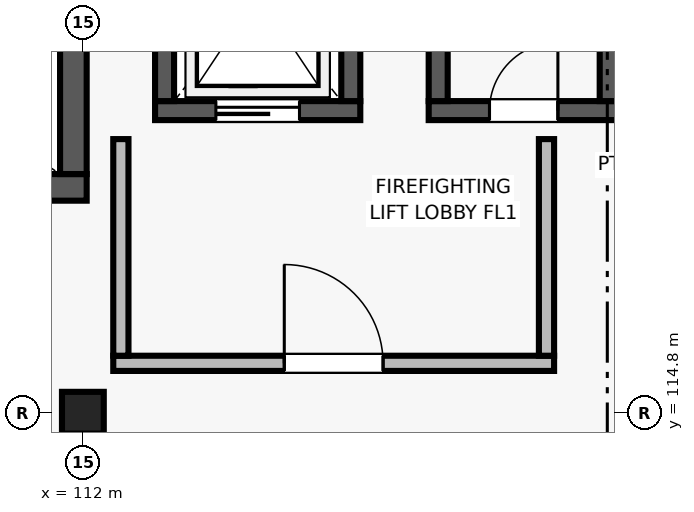
"""IFC4 building model, lengths in metres.
Left out: names, types, materials, properties, quantities, classifications, styles, units other than length and angle.
Written with IfcOpenShell. Run it as: python <this file> out.ifc"""

import sys

from ifc_helpers import new_model, si_unit, direction, frame, frame_2d, origin, origin_2d, place, context, subcontext, project, spatial, rectangle, extrude, element, fill, save


model = new_model("IFC4")
c1 = context("Model", 3, precision=1e-05, world=origin(), true_north=direction((0.0, 1.0)))
c2 = subcontext(c1, "Body", "Model", "MODEL_VIEW")
j1 = project(units=[si_unit("LENGTHUNIT", "METRE"), si_unit("PLANEANGLEUNIT", "RADIAN")], contexts=[c1])
p1 = place(None, origin())
s1 = spatial("IfcSite", under=j1, at=p1, CompositionType="ELEMENT")
p2 = place(p1, origin())
s2 = spatial("IfcBuilding", under=s1, at=p2, CompositionType="ELEMENT")
p3 = place(p2, frame((0.0, 0.0, 21.6)))
s3 = spatial("IfcBuildingStorey", under=s2, at=p3, CompositionType="ELEMENT", Elevation=21.6)
p4 = place(p3, frame((112.0, 114.8, 0.0), z_axis=(0.0, 0.0, 1.0), x_axis=(1.0, 0.0, 0.0)))
e1 = element("IfcColumn", 1, at=p4, inside=s3, PredefinedType="COLUMN", context=c2, shape_type="SweptSolid", body=[
    extrude(rectangle(XDim=0.55, YDim=0.55, at=origin_2d()), origin(), (0.0, 0.0, 1.0), 4.2),
])
p5 = place(p3, frame((103.95, 117.765, 0.0), z_axis=(0.0, 0.0, 1.0), x_axis=(1.0, 0.0, 0.0)))
e2 = element("IfcWall", 2, at=p5, inside=s3, PredefinedType="SHEAR", context=c2, shape_type="SweptSolid", body=[
    extrude(rectangle(XDim=8.1, YDim=0.35, at=frame_2d((4.05, 0.0))), origin(), (0.0, 0.0, 1.0), 3.92),
])
p6 = place(p5, frame((0.6, 0.0, 0.0)))
e3 = element("IfcOpeningElement", 3, at=p6, cuts=e2, PredefinedType="OPENING", context=c2, shape_type="SweptSolid", body=[
    extrude(rectangle(XDim=1.25, YDim=2.2, at=frame_2d((0.625, 1.1))), frame((0.0, 0.185, 0.0), z_axis=(0.0, -1.0, 0.0), x_axis=(1.0, 0.0, 0.0)), (0.0, 0.0, 1.0), 0.37),
])
p7 = place(p3, frame((111.875, 117.94, 0.0), z_axis=(0.0, 0.0, 1.0), x_axis=(0.0, 1.0, 0.0)))
e4 = element("IfcWall", 4, at=p7, inside=s3, PredefinedType="SHEAR", context=c2, shape_type="SweptSolid", body=[
    extrude(rectangle(XDim=3.76, YDim=0.35, at=frame_2d((1.88, 0.0))), origin(), (0.0, 0.0, 1.0), 3.92),
])
p8 = place(p3, frame((112.95, 118.775, 0.0), z_axis=(0.0, 0.0, 1.0), x_axis=(1.0, 0.0, 0.0)))
e5 = element("IfcWall", 5, at=p8, inside=s3, PredefinedType="SHEAR", context=c2, shape_type="SweptSolid", body=[
    extrude(rectangle(XDim=2.7, YDim=0.25, at=frame_2d((1.35, 0.0))), origin(), (0.0, 0.0, 1.0), 3.92),
])
p9 = place(p8, frame((0.8, 0.0, 0.0)))
e6 = element("IfcOpeningElement", 6, at=p9, cuts=e5, PredefinedType="OPENING", context=c2, shape_type="SweptSolid", body=[
    extrude(rectangle(XDim=1.1, YDim=2.15, at=frame_2d((0.55, 1.075))), frame((0.0, 0.135, 0.0), z_axis=(0.0, -1.0, 0.0), x_axis=(1.0, 0.0, 0.0)), (0.0, 0.0, 1.0), 0.27),
])
for number, where, z_axis, x_axis in (
    (7, (113.075, 118.9, 0.0), (0.0, 0.0, 1.0), (0.0, 1.0, 0.0)),
    (8, (115.525, 118.9, 0.0), (0.0, 0.0, 1.0), (0.0, 1.0, 0.0)),
):
    element("IfcWall", number, at=place(p3, frame(where, z_axis=z_axis, x_axis=x_axis)), inside=s3, PredefinedType="SHEAR", context=c2, shape_type="SweptSolid", body=[
        extrude(rectangle(XDim=2.8, YDim=0.25, at=frame_2d((1.4, 0.0))), origin(), (0.0, 0.0, 1.0), 3.92),
    ])
p10 = place(p3, frame((112.4, 115.45, 0.0), z_axis=(0.0, 0.0, 1.0), x_axis=(1.0, 0.0, 0.0)))
e9 = element("IfcWall", 9, at=p10, inside=s3, PredefinedType="SOLIDWALL", context=c2, shape_type="SweptSolid", body=[
    extrude(rectangle(XDim=5.8, YDim=0.2, at=frame_2d((2.9, 0.0))), origin(), (0.0, 0.0, 1.0), 3.92),
])
p11 = place(p10, frame((2.25, 0.0, 0.0)))
e10 = element("IfcOpeningElement", 10, at=p11, cuts=e9, PredefinedType="OPENING", context=c2, shape_type="SweptSolid", body=[
    extrude(rectangle(XDim=1.3, YDim=2.2, at=frame_2d((0.65, 1.1))), frame((0.0, 0.11, 0.0), z_axis=(0.0, -1.0, 0.0), x_axis=(1.0, 0.0, 0.0)), (0.0, 0.0, 1.0), 0.22),
])
for number, where, z_axis, x_axis in (
    (11, (112.5, 115.55, 0.0), (0.0, 0.0, 1.0), (0.0, 1.0, 0.0)),
    (12, (118.1, 115.55, 0.0), (0.0, 0.0, 1.0), (0.0, 1.0, 0.0)),
):
    element("IfcWall", number, at=place(p3, frame(where, z_axis=z_axis, x_axis=x_axis)), inside=s3, PredefinedType="SOLIDWALL", context=c2, shape_type="SweptSolid", body=[
        extrude(rectangle(XDim=2.85, YDim=0.2, at=frame_2d((1.425, 0.0))), origin(), (0.0, 0.0, 1.0), 3.92),
    ])
p12 = place(p3, frame((116.55, 118.775, 0.0), z_axis=(0.0, 0.0, 1.0), x_axis=(1.0, 0.0, 0.0)))
e13 = element("IfcWall", 13, at=p12, inside=s3, PredefinedType="SHEAR", context=c2, shape_type="SweptSolid", body=[
    extrude(rectangle(XDim=2.5, YDim=0.25, at=frame_2d((1.25, 0.0))), origin(), (0.0, 0.0, 1.0), 3.92),
])
p13 = place(p12, frame((0.8, 0.0, 0.0)))
e14 = element("IfcOpeningElement", 14, at=p13, cuts=e13, PredefinedType="OPENING", context=c2, shape_type="SweptSolid", body=[
    extrude(rectangle(XDim=0.9, YDim=2.05, at=frame_2d((0.45, 1.025))), frame((0.0, 0.135, 0.0), z_axis=(0.0, -1.0, 0.0), x_axis=(1.0, 0.0, 0.0)), (0.0, 0.0, 1.0), 0.27),
])
for number, where, z_axis, x_axis in (
    (15, (116.675, 118.9, 0.0), (0.0, 0.0, 1.0), (0.0, 1.0, 0.0)),
    (16, (118.925, 118.9, 0.0), (0.0, 0.0, 1.0), (0.0, 1.0, 0.0)),
):
    element("IfcWall", number, at=place(p3, frame(where, z_axis=z_axis, x_axis=x_axis)), inside=s3, PredefinedType="SHEAR", context=c2, shape_type="SweptSolid", body=[
        extrude(rectangle(XDim=2.8, YDim=0.25, at=frame_2d((1.4, 0.0))), origin(), (0.0, 0.0, 1.0), 3.92),
    ])
p14 = place(p11, origin())
e17 = element("IfcDoor", 17, at=p14, inside=s3, OperationType="SINGLE_SWING_LEFT", PredefinedType="DOOR", context=c2, shape_type="SweptSolid", body=[
    extrude(rectangle(XDim=1.3, YDim=2.2, at=frame_2d((0.65, 1.1))), frame((0.0, 0.025, 0.0), z_axis=(0.0, -1.0, 0.0), x_axis=(1.0, 0.0, 0.0)), (0.0, 0.0, 1.0), 0.05),
])
fill(e10, e17)
p15 = place(p13, origin())
e18 = element("IfcDoor", 18, at=p15, inside=s3, OperationType="SINGLE_SWING_RIGHT", PredefinedType="DOOR", context=c2, shape_type="SweptSolid", body=[
    extrude(rectangle(XDim=0.9, YDim=2.05, at=frame_2d((0.45, 1.025))), frame((0.0, 0.025, 0.0), z_axis=(0.0, -1.0, 0.0), x_axis=(1.0, 0.0, 0.0)), (0.0, 0.0, 1.0), 0.05),
])
fill(e14, e18)
p16 = place(p9, origin())
e19 = element("IfcDoor", 19, at=p16, inside=s3, OperationType="SLIDING_TO_LEFT", PredefinedType="DOOR", context=c2, shape_type="SweptSolid", body=[
    extrude(rectangle(XDim=1.1, YDim=2.15, at=frame_2d((0.55, 1.075))), frame((0.0, 0.025, 0.0), z_axis=(0.0, -1.0, 0.0), x_axis=(1.0, 0.0, 0.0)), (0.0, 0.0, 1.0), 0.05),
])
fill(e6, e19)
save(model, sys.argv[1])
